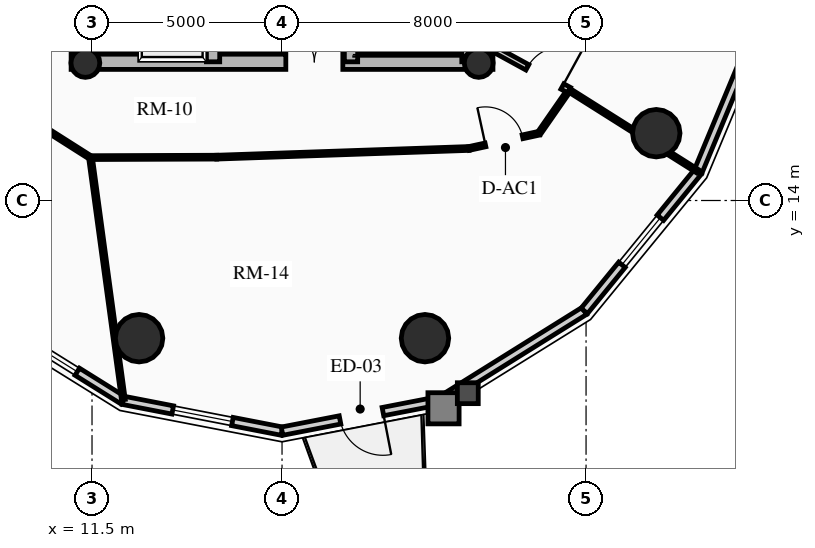
"""IFC4 building model, lengths in metres.
Left out: names, types, materials, properties, quantities, classifications, styles, units other than length and angle.
Written with IfcOpenShell. Run it as: python <this file> out.ifc"""

import sys

from ifc_helpers import new_model, si_unit, direction, frame, frame_2d, origin, origin_2d, place, context, subcontext, project, spatial, rectangle, circle, hollow_circle, extrude, source, transform, mapped, element, fill, save


model = new_model("IFC4")
c1 = context("Model", 3, precision=1e-05, world=origin(), true_north=direction((0.0, 1.0)))
c2 = subcontext(c1, "Body", "Model", "MODEL_VIEW")
j1 = project(units=[si_unit("LENGTHUNIT", "METRE"), si_unit("PLANEANGLEUNIT", "RADIAN")], contexts=[c1])
p1 = place(None, origin())
s1 = spatial("IfcSite", under=j1, at=p1, CompositionType="ELEMENT")
p2 = place(p1, origin())
s2 = spatial("IfcBuilding", under=s1, at=p2, CompositionType="ELEMENT")
p3 = place(p2, frame((0.0, 0.0, 186.52)))
s3 = spatial("IfcBuildingStorey", under=s2, at=p3, CompositionType="ELEMENT", Elevation=186.52)
for number, where, z_axis, x_axis in (
    (1, (11.15, 17.45, 0.0), (0.0, 0.0, 1.0), (0.0, 1.0, 0.0)),
    (2, (21.85, 17.45, 0.0), (0.0, 0.0, 1.0), (0.0, 1.0, 0.0)),
):
    element("IfcWall", number, at=place(p3, frame(where, z_axis=z_axis, x_axis=x_axis)), inside=s3, PredefinedType="SHEAR", context=c2, shape_type="SweptSolid", body=[
        extrude(rectangle(XDim=14.1, YDim=0.4, at=frame_2d((7.05, 0.0))), origin(), (0.0, 0.0, 1.0), 2.91),
    ])
p4 = place(p3, frame((11.15, 17.65, 0.0), z_axis=(0.0, 0.0, 1.0), x_axis=(1.0, 0.0, 0.0)))
e3 = element("IfcWall", 3, at=p4, inside=s3, PredefinedType="SHEAR", context=c2, shape_type="SweptSolid", body=[
    extrude(rectangle(XDim=10.7, YDim=0.4, at=frame_2d((5.35, 0.0))), origin(), (0.0, 0.0, 1.0), 2.91),
])
m1 = source(origin(), c2, "Body", "SweptSolid", [
    extrude(rectangle(XDim=1.5, YDim=2.02, at=frame_2d((0.75, 1.01))), frame((0.0, 0.21, 0.0), z_axis=(0.0, -1.0, 0.0), x_axis=(1.0, 0.0, 0.0)), (0.0, 0.0, 1.0), 0.42),
])
p5 = place(p4, frame((5.45, 0.0, 0.0)))
e4 = element("IfcOpeningElement", 4, at=p5, cuts=e3, PredefinedType="OPENING", context=c2, shape_type="MappedRepresentation", body=[
    mapped(m1, transform((0.0, 0.0, 0.0), x_axis=(1.0, 0.0, 0.0), y_axis=(0.0, 1.0, 0.0), z_axis=(0.0, 0.0, 1.0), scale=1.0)),
])
p6 = place(p3, frame((14.685, 17.65, 0.0), z_axis=(0.0, 0.0, 1.0), x_axis=(0.0, 1.0, 0.0)))
e5 = element("IfcWall", 5, at=p6, inside=s3, PredefinedType="SHEAR", context=c2, shape_type="SweptSolid", body=[
    extrude(rectangle(XDim=13.7, YDim=0.35, at=frame_2d((6.85, 0.0))), origin(), (0.0, 0.0, 1.0), 2.91),
])
m2 = source(origin(), c2, "Body", "SweptSolid", [
    extrude(rectangle(XDim=1.1, YDim=2.015, at=frame_2d((0.55, 1.007))), frame((0.0, 0.185, 0.0), z_axis=(0.0, -1.0, 0.0), x_axis=(1.0, 0.0, 0.0)), (0.0, 0.0, 1.0), 0.37),
])
p7 = place(p6, frame((4.85, 0.0, 0.0)))
e6 = element("IfcOpeningElement", 6, at=p7, cuts=e5, PredefinedType="OPENING", context=c2, shape_type="MappedRepresentation", body=[
    mapped(m2, transform((0.0, 0.0, 0.0), x_axis=(1.0, 0.0, 0.0), y_axis=(0.0, 1.0, 0.0), z_axis=(0.0, 0.0, 1.0), scale=1.0)),
])
p8 = place(p6, frame((0.625, 0.0, 0.0)))
e7 = element("IfcOpeningElement", 7, at=p8, cuts=e5, PredefinedType="OPENING", context=c2, shape_type="MappedRepresentation", body=[
    mapped(m2, transform((0.0, 0.0, 0.0), x_axis=(1.0, 0.0, 0.0), y_axis=(0.0, 1.0, 0.0), z_axis=(0.0, 0.0, 1.0), scale=1.0)),
])
p9 = place(p6, frame((2.625, 0.0, 0.0)))
e8 = element("IfcOpeningElement", 8, at=p9, cuts=e5, PredefinedType="OPENING", context=c2, shape_type="MappedRepresentation", body=[
    mapped(m2, transform((0.0, 0.0, 0.0), x_axis=(1.0, 0.0, 0.0), y_axis=(0.0, 1.0, 0.0), z_axis=(0.0, 0.0, 1.0), scale=1.0)),
])
m3 = source(origin(), c2, "Body", "SweptSolid", [
    extrude(rectangle(XDim=1.15, YDim=2.02, at=frame_2d((0.575, 1.01))), frame((0.0, 0.185, 0.0), z_axis=(0.0, -1.0, 0.0), x_axis=(1.0, 0.0, 0.0)), (0.0, 0.0, 1.0), 0.37),
])
p10 = place(p6, frame((7.27, 0.0, 0.0)))
e9 = element("IfcOpeningElement", 9, at=p10, cuts=e5, PredefinedType="OPENING", context=c2, shape_type="MappedRepresentation", body=[
    mapped(m3, transform((0.0, 0.0, 0.0), x_axis=(1.0, 0.0, 0.0), y_axis=(0.0, 1.0, 0.0), z_axis=(0.0, 0.0, 1.0), scale=1.0)),
])
p11 = place(p3, frame((18.315, 17.65, 0.0), z_axis=(0.0, 0.0, 1.0), x_axis=(0.0, 1.0, 0.0)))
e10 = element("IfcWall", 10, at=p11, inside=s3, PredefinedType="SHEAR", context=c2, shape_type="SweptSolid", body=[
    extrude(rectangle(XDim=9.6, YDim=0.35, at=frame_2d((4.8, 0.0))), origin(), (0.0, 0.0, 1.0), 2.91),
])
p12 = place(p11, frame((5.28, 0.0, 0.0)))
e11 = element("IfcOpeningElement", 11, at=p12, cuts=e10, PredefinedType="OPENING", context=c2, shape_type="MappedRepresentation", body=[
    mapped(m3, transform((0.0, 0.0, 0.0), x_axis=(1.0, 0.0, 0.0), y_axis=(0.0, 1.0, 0.0), z_axis=(0.0, 0.0, 1.0), scale=1.0)),
])
p13 = place(p3, frame((21.405, 17.65, 0.0), z_axis=(0.0, 0.0, 1.0), x_axis=(0.0, 1.0, 0.0)))
e12 = element("IfcWall", 12, at=p13, inside=s3, PredefinedType="SHEAR", context=c2, shape_type="SweptSolid", body=[
    extrude(rectangle(XDim=6.695, YDim=0.35, at=frame_2d((3.348, 0.0))), origin(), (0.0, 0.0, 1.0), 2.91),
])
for number, where, z_axis, x_axis in (
    (13, (11.325, 17.62, 0.0), (0.0, 0.0, 1.0), (1.0, 0.0, 0.0)),
    (14, (21.675, 17.62, 0.0), (0.0, 0.0, 1.0), (1.0, 0.0, 0.0)),
):
    element("IfcColumn", number, at=place(p3, frame(where, z_axis=z_axis, x_axis=x_axis)), inside=s3, PredefinedType="COLUMN", context=c2, shape_type="SweptSolid", body=[
        extrude(hollow_circle(Radius=0.38, WallThickness=0.032, at=origin_2d()), origin(), (0.0, 0.0, 1.0), 2.91),
    ])
for number, where, z_axis, x_axis in (
    (15, (12.739, 10.377, 0.0), (0.0, 0.0, 1.0), (1.0, 0.0, 0.0)),
    (16, (20.261, 10.377, 0.0), (0.0, 0.0, 1.0), (1.0, 0.0, 0.0)),
    (17, (26.347, 15.771, 0.0), (0.0, 0.0, 1.0), (1.0, 0.0, 0.0)),
):
    element("IfcColumn", number, at=place(p3, frame(where, z_axis=z_axis, x_axis=x_axis)), inside=s3, PredefinedType="USERDEFINED", context=c2, shape_type="SweptSolid", body=[
        extrude(circle(Radius=0.625, at=origin_2d()), origin(), (0.0, 0.0, 1.0), 2.91),
    ])
p14 = place(p3, frame((12.319, 8.741, 0.0), z_axis=(0.0, 0.0, 1.0), x_axis=(-0.848399108042, 0.529357113368, 0.0)))
e18 = element("IfcWall", 18, at=p14, inside=s3, PredefinedType="SOLIDWALL", context=c2, shape_type="SweptSolid", body=[
    extrude(rectangle(XDim=4.446, YDim=0.22, at=frame_2d((2.223, 0.0))), origin(), (0.0, 0.0, 1.0), 2.245),
])
m4 = source(origin(), c2, "Body", "SweptSolid", [
    extrude(rectangle(XDim=1.6, YDim=1.3, at=frame_2d((0.8, 0.65))), frame((0.0, 0.12, 0.0), z_axis=(0.0, -1.0, 0.0), x_axis=(1.0, 0.0, 0.0)), (0.0, 0.0, 1.0), 0.24),
])
p15 = place(p14, frame((1.423, 0.0, 0.65)))
e19 = element("IfcOpeningElement", 19, at=p15, cuts=e18, PredefinedType="OPENING", context=c2, shape_type="MappedRepresentation", body=[
    mapped(m4, transform((0.0, 0.0, 0.0), x_axis=(1.0, 0.0, 0.0), y_axis=(0.0, 1.0, 0.0), z_axis=(0.0, 0.0, 1.0), scale=1.0)),
])
p16 = place(p3, frame((16.5, 7.93, 0.0), z_axis=(0.0, 0.0, 1.0), x_axis=(-0.981703883443, 0.190413983815, 0.0)))
e20 = element("IfcWall", 20, at=p16, inside=s3, PredefinedType="SOLIDWALL", context=c2, shape_type="SweptSolid", body=[
    extrude(rectangle(XDim=4.259, YDim=0.22, at=frame_2d((2.13, 0.0))), origin(), (0.0, 0.0, 1.0), 2.245),
])
p17 = place(p16, frame((1.33, 0.0, 0.65)))
e21 = element("IfcOpeningElement", 21, at=p17, cuts=e20, PredefinedType="OPENING", context=c2, shape_type="MappedRepresentation", body=[
    mapped(m4, transform((0.0, 0.0, 0.0), x_axis=(1.0, 0.0, 0.0), y_axis=(0.0, 1.0, 0.0), z_axis=(0.0, 0.0, 1.0), scale=1.0)),
])
p18 = place(p3, frame((20.681, 8.741, 0.0), z_axis=(0.0, 0.0, 1.0), x_axis=(-0.981703883443, -0.190413983815, 0.0)))
e22 = element("IfcWall", 22, at=p18, inside=s3, PredefinedType="SOLIDWALL", context=c2, shape_type="SweptSolid", body=[
    extrude(rectangle(XDim=4.259, YDim=0.22, at=frame_2d((2.13, 0.0))), origin(), (0.0, 0.0, 1.0), 2.245),
])
m5 = source(origin(), c2, "Body", "SweptSolid", [
    extrude(rectangle(XDim=1.15, YDim=2.005, at=frame_2d((0.575, 1.002))), frame((0.0, 0.12, 0.0), z_axis=(0.0, -1.0, 0.0), x_axis=(1.0, 0.0, 0.0)), (0.0, 0.0, 1.0), 0.24),
])
p19 = place(p18, frame((1.555, 0.0, 0.0)))
e23 = element("IfcOpeningElement", 23, at=p19, cuts=e22, PredefinedType="OPENING", context=c2, shape_type="MappedRepresentation", body=[
    mapped(m5, transform((0.0, 0.0, 0.0), x_axis=(1.0, 0.0, 0.0), y_axis=(0.0, 1.0, 0.0), z_axis=(0.0, 0.0, 1.0), scale=1.0)),
])
p20 = place(p3, frame((24.453, 11.094, 0.0), z_axis=(0.0, 0.0, 1.0), x_axis=(-0.848399108042, -0.529357113368, 0.0)))
e24 = element("IfcWall", 24, at=p20, inside=s3, PredefinedType="SOLIDWALL", context=c2, shape_type="SweptSolid", body=[
    extrude(rectangle(XDim=4.446, YDim=0.22, at=frame_2d((2.223, 0.0))), origin(), (0.0, 0.0, 1.0), 2.245),
])
p21 = place(p3, frame((27.447, 14.76, 0.0), z_axis=(0.0, 0.0, 1.0), x_axis=(-0.632470615287, -0.774584353572, 0.0)))
e25 = element("IfcWall", 25, at=p21, inside=s3, PredefinedType="SOLIDWALL", context=c2, shape_type="SweptSolid", body=[
    extrude(rectangle(XDim=4.733, YDim=0.22, at=frame_2d((2.366, 0.0))), origin(), (0.0, 0.0, 1.0), 2.245),
])
p22 = place(p21, frame((1.566, 0.0, 0.65)))
e26 = element("IfcOpeningElement", 26, at=p22, cuts=e25, PredefinedType="OPENING", context=c2, shape_type="MappedRepresentation", body=[
    mapped(m4, transform((0.0, 0.0, 0.0), x_axis=(1.0, 0.0, 0.0), y_axis=(0.0, 1.0, 0.0), z_axis=(0.0, 0.0, 1.0), scale=1.0)),
])
p23 = place(p3, frame((29.369, 19.38, 0.0), z_axis=(0.0, 0.0, 1.0), x_axis=(-0.384144094086, -0.923273152961, 0.0)))
e27 = element("IfcWall", 27, at=p23, inside=s3, PredefinedType="SOLIDWALL", context=c2, shape_type="SweptSolid", body=[
    extrude(rectangle(XDim=5.003, YDim=0.22, at=frame_2d((2.501, 0.0))), origin(), (0.0, 0.0, 1.0), 2.245),
])
p24 = place(p3, frame((10.115, 15.983, 0.0), z_axis=(0.0, 0.0, 1.0), x_axis=(0.843995849351, -0.536349705209, 0.0)))
e28 = element("IfcWall", 28, at=p24, inside=s3, PredefinedType="MOVABLE", context=c2, shape_type="SweptSolid", body=[
    extrude(rectangle(XDim=1.593, YDim=0.1, at=frame_2d((0.796, 0.0))), origin(), (0.0, 0.0, 1.0), 2.245),
])
p25 = place(p3, frame((11.46, 15.129, 0.0), z_axis=(0.0, 0.0, 1.0), x_axis=(0.999993513287, 0.003601858435, 0.0)))
e29 = element("IfcWall", 29, at=p25, inside=s3, PredefinedType="MOVABLE", context=c2, shape_type="SweptSolid", body=[
    extrude(rectangle(XDim=3.321, YDim=0.1, at=frame_2d((1.661, 0.0))), origin(), (0.0, 0.0, 1.0), 2.245),
])
p26 = place(p3, frame((14.781, 15.141, 0.0), z_axis=(0.0, 0.0, 1.0), x_axis=(0.999407918707, 0.034406569513, 0.0)))
e30 = element("IfcWall", 30, at=p26, inside=s3, PredefinedType="MOVABLE", context=c2, shape_type="SweptSolid", body=[
    extrude(rectangle(XDim=6.642, YDim=0.1, at=frame_2d((3.321, 0.0))), origin(), (0.0, 0.0, 1.0), 2.245),
])
p27 = place(p3, frame((21.419, 15.369, 0.0), z_axis=(0.0, 0.0, 1.0), x_axis=(0.977192701953, 0.212354475464, 0.0)))
e31 = element("IfcWall", 31, at=p27, inside=s3, PredefinedType="MOVABLE", context=c2, shape_type="SweptSolid", body=[
    extrude(rectangle(XDim=1.888, YDim=0.1, at=frame_2d((0.944, 0.0))), origin(), (0.0, 0.0, 1.0), 2.245),
])
m6 = source(origin(), c2, "Body", "SweptSolid", [
    extrude(rectangle(XDim=1.0, YDim=2.015, at=frame_2d((0.5, 1.007))), frame((0.0, 0.06, 0.0), z_axis=(0.0, -1.0, 0.0), x_axis=(1.0, 0.0, 0.0)), (0.0, 0.0, 1.0), 0.12),
])
p28 = place(p27, frame((0.444, 0.0, 0.0)))
e32 = element("IfcOpeningElement", 32, at=p28, cuts=e31, PredefinedType="OPENING", context=c2, shape_type="MappedRepresentation", body=[
    mapped(m6, transform((0.0, 0.0, 0.0), x_axis=(1.0, 0.0, 0.0), y_axis=(0.0, 1.0, 0.0), z_axis=(0.0, 0.0, 1.0), scale=1.0)),
])
p29 = place(p3, frame((23.263, 15.77, 0.0), z_axis=(0.0, 0.0, 1.0), x_axis=(0.570743456919, 0.821128434768, 0.0)))
e33 = element("IfcWall", 33, at=p29, inside=s3, PredefinedType="MOVABLE", context=c2, shape_type="SweptSolid", body=[
    extrude(rectangle(XDim=1.382, YDim=0.1, at=frame_2d((0.691, 0.0))), origin(), (0.0, 0.0, 1.0), 2.245),
])
p30 = place(p3, frame((11.46, 15.129, 0.0), z_axis=(0.0, 0.0, 1.0), x_axis=(0.134621607411, -0.990897079831, 0.0)))
e34 = element("IfcWall", 34, at=p30, inside=s3, PredefinedType="MOVABLE", context=c2, shape_type="SweptSolid", body=[
    extrude(rectangle(XDim=6.427, YDim=0.1, at=frame_2d((3.214, 0.0))), origin(), (0.0, 0.0, 1.0), 2.245),
])
p31 = place(p3, frame((24.052, 16.905, 0.0), z_axis=(0.0, 0.0, 1.0), x_axis=(0.845666007609, -0.533712472755, 0.0)))
e35 = element("IfcWall", 35, at=p31, inside=s3, PredefinedType="MOVABLE", context=c2, shape_type="SweptSolid", body=[
    extrude(rectangle(XDim=3.995, YDim=0.1, at=frame_2d((1.998, 0.0))), origin(), (0.0, 0.0, 1.0), 2.245),
])
p32 = place(p3, frame((22.05, 18.0, 0.0), z_axis=(0.0, 0.0, 1.0), x_axis=(0.877252891813, -0.480028503118, 0.0)))
e36 = element("IfcWall", 36, at=p32, inside=s3, PredefinedType="PARTITIONING", context=c2, shape_type="SweptSolid", body=[
    extrude(rectangle(XDim=2.282, YDim=0.16, at=frame_2d((1.141, 0.0))), origin(), (0.0, 0.0, 1.0), 2.245),
])
m7 = source(origin(), c2, "Body", "SweptSolid", [
    extrude(rectangle(XDim=1.05, YDim=2.015, at=frame_2d((0.525, 1.007))), frame((0.0, 0.09, 0.0), z_axis=(0.0, -1.0, 0.0), x_axis=(1.0, 0.0, 0.0)), (0.0, 0.0, 1.0), 0.18),
])
p33 = place(p32, frame((1.032, 0.0, 0.0)))
e37 = element("IfcOpeningElement", 37, at=p33, cuts=e36, PredefinedType="OPENING", context=c2, shape_type="MappedRepresentation", body=[
    mapped(m7, transform((0.0, 0.0, 0.0), x_axis=(1.0, 0.0, 0.0), y_axis=(0.0, 1.0, 0.0), z_axis=(0.0, 0.0, 1.0), scale=1.0)),
])
m8 = source(origin(), c2, "Body", "SweptSolid", [
    extrude(rectangle(XDim=1.6, YDim=1.3, at=frame_2d((0.8, 0.65))), frame((0.0, 0.03, 0.0), z_axis=(0.0, -1.0, 0.0), x_axis=(1.0, 0.0, 0.0)), (0.0, 0.0, 1.0), 0.06),
])
p34 = place(p15, origin())
e38 = element("IfcWindow", 38, at=p34, inside=s3, PartitioningType="SINGLE_PANEL", PredefinedType="WINDOW", context=c2, shape_type="MappedRepresentation", body=[
    mapped(m8, transform((0.0, 0.0, 0.0), x_axis=(1.0, 0.0, 0.0), y_axis=(0.0, 1.0, 0.0), z_axis=(0.0, 0.0, 1.0), scale=1.0)),
])
fill(e19, e38)
p35 = place(p17, origin())
e39 = element("IfcWindow", 39, at=p35, inside=s3, PartitioningType="SINGLE_PANEL", PredefinedType="WINDOW", context=c2, shape_type="MappedRepresentation", body=[
    mapped(m8, transform((0.0, 0.0, 0.0), x_axis=(1.0, 0.0, 0.0), y_axis=(0.0, 1.0, 0.0), z_axis=(0.0, 0.0, 1.0), scale=1.0)),
])
fill(e21, e39)
m9 = source(origin(), c2, "Body", "SweptSolid", [
    extrude(rectangle(XDim=1.15, YDim=2.005, at=frame_2d((0.575, 1.002))), frame((0.0, 0.025, 0.0), z_axis=(0.0, -1.0, 0.0), x_axis=(1.0, 0.0, 0.0)), (0.0, 0.0, 1.0), 0.05),
])
p36 = place(p19, origin())
e40 = element("IfcDoor", 40, at=p36, inside=s3, OperationType="SINGLE_SWING_LEFT", PredefinedType="DOOR", context=c2, shape_type="MappedRepresentation", body=[
    mapped(m9, transform((0.0, 0.0, 0.0), x_axis=(1.0, 0.0, 0.0), y_axis=(0.0, 1.0, 0.0), z_axis=(0.0, 0.0, 1.0), scale=1.0)),
])
fill(e23, e40)
p37 = place(p22, origin())
e41 = element("IfcWindow", 41, at=p37, inside=s3, PartitioningType="SINGLE_PANEL", PredefinedType="WINDOW", context=c2, shape_type="MappedRepresentation", body=[
    mapped(m8, transform((0.0, 0.0, 0.0), x_axis=(1.0, 0.0, 0.0), y_axis=(0.0, 1.0, 0.0), z_axis=(0.0, 0.0, 1.0), scale=1.0)),
])
fill(e26, e41)
m10 = source(origin(), c2, "Body", "SweptSolid", [
    extrude(rectangle(XDim=1.5, YDim=2.02, at=frame_2d((0.75, 1.01))), frame((0.0, 0.025, 0.0), z_axis=(0.0, -1.0, 0.0), x_axis=(1.0, 0.0, 0.0)), (0.0, 0.0, 1.0), 0.05),
])
p38 = place(p5, origin())
e42 = element("IfcDoor", 42, at=p38, inside=s3, OperationType="DOUBLE_DOOR_SINGLE_SWING", PredefinedType="DOOR", context=c2, shape_type="MappedRepresentation", body=[
    mapped(m10, transform((0.0, 0.0, 0.0), x_axis=(1.0, 0.0, 0.0), y_axis=(0.0, 1.0, 0.0), z_axis=(0.0, 0.0, 1.0), scale=1.0)),
])
fill(e4, e42)
m11 = source(origin(), c2, "Body", "SweptSolid", [
    extrude(rectangle(XDim=1.05, YDim=2.015, at=frame_2d((0.525, 1.007))), frame((0.0, 0.025, 0.0), z_axis=(0.0, -1.0, 0.0), x_axis=(1.0, 0.0, 0.0)), (0.0, 0.0, 1.0), 0.05),
])
p39 = place(p33, origin())
e43 = element("IfcDoor", 43, at=p39, inside=s3, OperationType="SINGLE_SWING_RIGHT", PredefinedType="DOOR", context=c2, shape_type="MappedRepresentation", body=[
    mapped(m11, transform((0.0, 0.0, 0.0), x_axis=(1.0, 0.0, 0.0), y_axis=(0.0, 1.0, 0.0), z_axis=(0.0, 0.0, 1.0), scale=1.0)),
])
fill(e37, e43)
m12 = source(origin(), c2, "Body", "SweptSolid", [
    extrude(rectangle(XDim=1.0, YDim=2.015, at=frame_2d((0.5, 1.007))), frame((0.0, 0.025, 0.0), z_axis=(0.0, -1.0, 0.0), x_axis=(1.0, 0.0, 0.0)), (0.0, 0.0, 1.0), 0.05),
])
p40 = place(p28, origin())
e44 = element("IfcDoor", 44, at=p40, inside=s3, OperationType="SINGLE_SWING_LEFT", PredefinedType="DOOR", context=c2, shape_type="MappedRepresentation", body=[
    mapped(m12, transform((0.0, 0.0, 0.0), x_axis=(1.0, 0.0, 0.0), y_axis=(0.0, 1.0, 0.0), z_axis=(0.0, 0.0, 1.0), scale=1.0)),
])
fill(e32, e44)
save(model, sys.argv[1])
